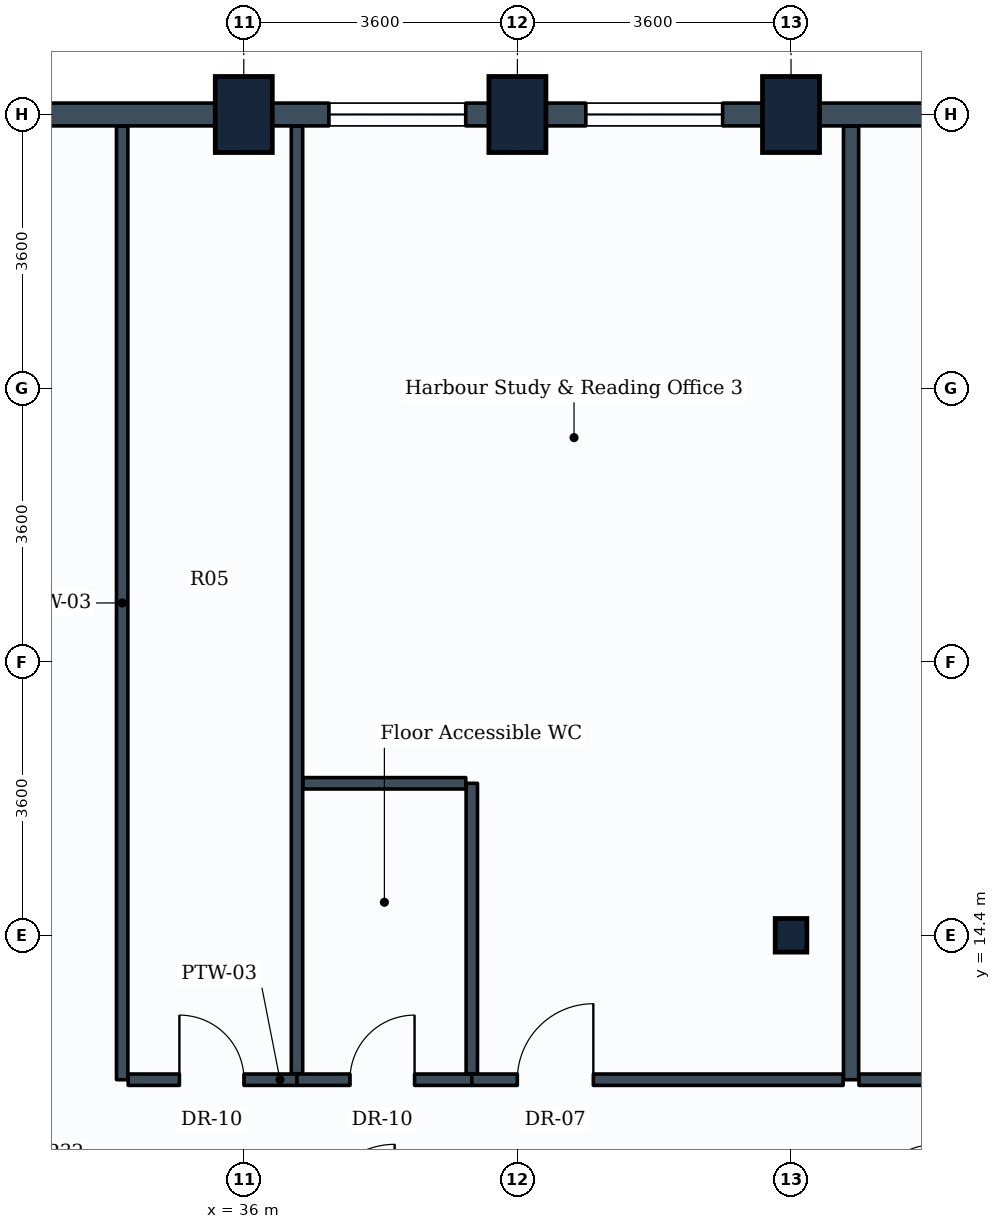
"""IFC4 building model, lengths in metres.
Left out: names, types, materials, properties, quantities, classifications, styles, units other than length and angle.
Written with IfcOpenShell. Run it as: python <this file> out.ifc"""

import sys

from ifc_helpers import new_model, si_unit, direction, frame, frame_2d, origin, origin_2d, place, context, subcontext, project, spatial, rectangle, i_section, extrude, element, fill, save


model = new_model("IFC4")
c1 = context("Model", 3, precision=1e-05, world=origin(), true_north=direction((0.0, 1.0)))
c2 = subcontext(c1, "Body", "Model", "MODEL_VIEW")
j1 = project(units=[si_unit("LENGTHUNIT", "METRE"), si_unit("PLANEANGLEUNIT", "RADIAN")], contexts=[c1])
p1 = place(None, origin())
s1 = spatial("IfcSite", under=j1, at=p1, CompositionType="ELEMENT")
p2 = place(p1, origin())
s2 = spatial("IfcBuilding", under=s1, at=p2, CompositionType="ELEMENT")
p3 = place(p2, frame((0.0, 0.0, 165.6)))
s3 = spatial("IfcBuildingStorey", under=s2, at=p3, CompositionType="ELEMENT", Elevation=165.6)
for number, where, z_axis, x_axis in (
    (1, (36.0, 25.2, 0.0), (0.0, 0.0, 1.0), (1.0, 0.0, 0.0)),
    (2, (39.6, 25.2, 0.0), (0.0, 0.0, 1.0), (1.0, 0.0, 0.0)),
):
    element("IfcColumn", number, at=place(p3, frame(where, z_axis=z_axis, x_axis=x_axis)), inside=s3, PredefinedType="COLUMN", context=c2, shape_type="SweptSolid", body=[
        extrude(rectangle(XDim=0.75, YDim=1.0, at=origin_2d()), origin(), (0.0, 0.0, 1.0), 3.8),
    ])
p4 = place(p3, frame((43.2, 14.4, 0.0), z_axis=(0.0, 0.0, 1.0), x_axis=(1.0, 0.0, 0.0)))
e3 = element("IfcColumn", 3, at=p4, inside=s3, PredefinedType="COLUMN", context=c2, shape_type="SweptSolid", body=[
    extrude(i_section(OverallWidth=0.416, OverallDepth=0.442, WebThickness=0.025, FlangeThickness=0.041, FilletRadius=0.015, at=origin_2d()), origin(), (0.0, 0.0, 1.0), 3.8),
])
p5 = place(p3, frame((43.2, 25.2, 0.0), z_axis=(0.0, 0.0, 1.0), x_axis=(1.0, 0.0, 0.0)))
e4 = element("IfcColumn", 4, at=p5, inside=s3, PredefinedType="COLUMN", context=c2, shape_type="SweptSolid", body=[
    extrude(rectangle(XDim=0.75, YDim=1.0, at=origin_2d()), origin(), (0.0, 0.0, 1.0), 3.8),
])
p6 = place(p3, frame((43.2, 25.2, 0.0), z_axis=(0.0, 0.0, 1.0), x_axis=(1.0, 0.0, 0.0)))
e5 = element("IfcWall", 5, at=p6, inside=s3, PredefinedType="STANDARD", context=c2, shape_type="SweptSolid", body=[
    extrude(rectangle(XDim=3.6, YDim=0.3, at=frame_2d((1.8, 0.0))), origin(), (0.0, 0.0, 1.0), 2.93),
])
p7 = place(p3, frame((39.6, 25.2, 0.0), z_axis=(0.0, 0.0, 1.0), x_axis=(1.0, 0.0, 0.0)))
e6 = element("IfcWall", 6, at=p7, inside=s3, PredefinedType="STANDARD", context=c2, shape_type="SweptSolid", body=[
    extrude(rectangle(XDim=3.6, YDim=0.3, at=frame_2d((1.8, 0.0))), origin(), (0.0, 0.0, 1.0), 2.93),
])
p8 = place(p7, frame((0.9, 0.0, 0.85)))
e7 = element("IfcOpeningElement", 7, at=p8, cuts=e6, PredefinedType="OPENING", context=c2, shape_type="SweptSolid", body=[
    extrude(rectangle(XDim=1.8, YDim=1.35, at=frame_2d((0.9, 0.675))), frame((0.0, 0.16, 0.0), z_axis=(0.0, -1.0, 0.0), x_axis=(1.0, 0.0, 0.0)), (0.0, 0.0, 1.0), 0.32),
])
p9 = place(p3, frame((36.0, 25.2, 0.0), z_axis=(0.0, 0.0, 1.0), x_axis=(1.0, 0.0, 0.0)))
e8 = element("IfcWall", 8, at=p9, inside=s3, PredefinedType="STANDARD", context=c2, shape_type="SweptSolid", body=[
    extrude(rectangle(XDim=3.6, YDim=0.3, at=frame_2d((1.8, 0.0))), origin(), (0.0, 0.0, 1.0), 2.93),
])
p10 = place(p9, frame((1.12, 0.0, 0.85)))
e9 = element("IfcOpeningElement", 9, at=p10, cuts=e8, PredefinedType="OPENING", context=c2, shape_type="SweptSolid", body=[
    extrude(rectangle(XDim=1.8, YDim=1.35, at=frame_2d((0.9, 0.675))), frame((0.0, 0.16, 0.0), z_axis=(0.0, -1.0, 0.0), x_axis=(1.0, 0.0, 0.0)), (0.0, 0.0, 1.0), 0.32),
])
p11 = place(p3, frame((32.4, 25.2, 0.0), z_axis=(0.0, 0.0, 1.0), x_axis=(1.0, 0.0, 0.0)))
e10 = element("IfcWall", 10, at=p11, inside=s3, PredefinedType="STANDARD", context=c2, shape_type="SweptSolid", body=[
    extrude(rectangle(XDim=3.6, YDim=0.3, at=frame_2d((1.8, 0.0))), origin(), (0.0, 0.0, 1.0), 2.93),
])
p12 = place(p3, frame((34.4, 12.5, 0.0), z_axis=(0.0, 0.0, 1.0), x_axis=(0.0, 1.0, 0.0)))
e11 = element("IfcWall", 11, at=p12, inside=s3, PredefinedType="PARTITIONING", context=c2, shape_type="SweptSolid", body=[
    extrude(rectangle(XDim=12.546, YDim=0.15, at=frame_2d((6.273, 0.0))), origin(), (0.0, 0.0, 1.0), 2.93),
])
p13 = place(p3, frame((34.479, 12.5, 0.0), z_axis=(0.0, 0.0, 1.0), x_axis=(1.0, 0.0, 0.0)))
e12 = element("IfcWall", 12, at=p13, inside=s3, PredefinedType="PARTITIONING", context=c2, shape_type="SweptSolid", body=[
    extrude(rectangle(XDim=2.221, YDim=0.15, at=frame_2d((1.11, 0.0))), origin(), (0.0, 0.0, 1.0), 3.15),
])
p14 = place(p13, frame((0.674, 0.0, 0.0)))
e13 = element("IfcOpeningElement", 13, at=p14, cuts=e12, PredefinedType="OPENING", context=c2, shape_type="SweptSolid", body=[
    extrude(rectangle(XDim=0.85, YDim=2.1, at=frame_2d((0.425, 1.05))), frame((0.0, 0.085, 0.0), z_axis=(0.0, -1.0, 0.0), x_axis=(1.0, 0.0, 0.0)), (0.0, 0.0, 1.0), 0.17),
])
p15 = place(p3, frame((36.7, 12.579, 0.0), z_axis=(0.0, 0.0, 1.0), x_axis=(0.0, 1.0, 0.0)))
e14 = element("IfcWall", 14, at=p15, inside=s3, PredefinedType="PARTITIONING", context=c2, shape_type="SweptSolid", body=[
    extrude(rectangle(XDim=12.467, YDim=0.15, at=frame_2d((6.233, 0.0))), origin(), (0.0, 0.0, 1.0), 2.93),
])
p16 = place(p3, frame((36.7, 12.5, 0.0), z_axis=(0.0, 0.0, 1.0), x_axis=(1.0, 0.0, 0.0)))
e15 = element("IfcWall", 15, at=p16, inside=s3, PredefinedType="PARTITIONING", context=c2, shape_type="SweptSolid", body=[
    extrude(rectangle(XDim=2.3, YDim=0.15, at=frame_2d((1.15, 0.0))), origin(), (0.0, 0.0, 1.0), 3.465),
])
p17 = place(p16, frame((0.697, 0.0, 0.0)))
e16 = element("IfcOpeningElement", 16, at=p17, cuts=e15, PredefinedType="OPENING", context=c2, shape_type="SweptSolid", body=[
    extrude(rectangle(XDim=0.85, YDim=2.1, at=frame_2d((0.425, 1.05))), frame((0.0, 0.085, 0.0), z_axis=(0.0, -1.0, 0.0), x_axis=(1.0, 0.0, 0.0)), (0.0, 0.0, 1.0), 0.17),
])
p18 = place(p3, frame((39.0, 12.579, 0.0), z_axis=(0.0, 0.0, 1.0), x_axis=(0.0, 1.0, 0.0)))
e17 = element("IfcWall", 17, at=p18, inside=s3, PredefinedType="PARTITIONING", context=c2, shape_type="SweptSolid", body=[
    extrude(rectangle(XDim=3.821, YDim=0.15, at=frame_2d((1.91, 0.0))), origin(), (0.0, 0.0, 1.0), 3.1),
])
p19 = place(p3, frame((36.779, 16.4, 0.0), z_axis=(0.0, 0.0, 1.0), x_axis=(1.0, 0.0, 0.0)))
e18 = element("IfcWall", 18, at=p19, inside=s3, PredefinedType="PARTITIONING", context=c2, shape_type="SweptSolid", body=[
    extrude(rectangle(XDim=2.142, YDim=0.15, at=frame_2d((1.071, 0.0))), origin(), (0.0, 0.0, 1.0), 3.465),
])
p20 = place(p3, frame((43.99, 12.5, 0.0), z_axis=(0.0, 0.0, 1.0), x_axis=(0.0, 1.0, 0.0)))
e19 = element("IfcWall", 19, at=p20, inside=s3, PredefinedType="PARTITIONING", context=c2, shape_type="SweptSolid", body=[
    extrude(rectangle(XDim=12.546, YDim=0.2, at=frame_2d((6.273, 0.0))), origin(), (0.0, 0.0, 1.0), 2.93),
])
p21 = place(p3, frame((39.0, 12.5, 0.0), z_axis=(0.0, 0.0, 1.0), x_axis=(1.0, 0.0, 0.0)))
e20 = element("IfcWall", 20, at=p21, inside=s3, PredefinedType="PARTITIONING", context=c2, shape_type="SweptSolid", body=[
    extrude(rectangle(XDim=4.886, YDim=0.15, at=frame_2d((2.443, 0.0))), origin(), (0.0, 0.0, 1.0), 3.1),
])
p22 = place(p21, frame((0.599, 0.0, 0.0)))
e21 = element("IfcOpeningElement", 21, at=p22, cuts=e20, PredefinedType="OPENING", context=c2, shape_type="SweptSolid", body=[
    extrude(rectangle(XDim=1.0, YDim=2.1, at=frame_2d((0.5, 1.05))), frame((0.0, 0.085, 0.0), z_axis=(0.0, -1.0, 0.0), x_axis=(1.0, 0.0, 0.0)), (0.0, 0.0, 1.0), 0.17),
])
p23 = place(p3, frame((44.094, 12.5, 0.0), z_axis=(0.0, 0.0, 1.0), x_axis=(1.0, 0.0, 0.0)))
e22 = element("IfcWall", 22, at=p23, inside=s3, PredefinedType="PARTITIONING", context=c2, shape_type="SweptSolid", body=[
    extrude(rectangle(XDim=4.506, YDim=0.15, at=frame_2d((2.253, 0.0))), origin(), (0.0, 0.0, 1.0), 3.1),
])
p24 = place(p23, frame((1.662, 0.0, 0.0)))
e23 = element("IfcOpeningElement", 23, at=p24, cuts=e22, PredefinedType="OPENING", context=c2, shape_type="SweptSolid", body=[
    extrude(rectangle(XDim=1.0, YDim=2.1, at=frame_2d((0.5, 1.05))), frame((0.0, 0.085, 0.0), z_axis=(0.0, -1.0, 0.0), x_axis=(1.0, 0.0, 0.0)), (0.0, 0.0, 1.0), 0.17),
])
p25 = place(p8, origin())
e24 = element("IfcWindow", 24, at=p25, inside=s3, PartitioningType="SINGLE_PANEL", PredefinedType="WINDOW", context=c2, shape_type="SweptSolid", body=[
    extrude(rectangle(XDim=1.8, YDim=1.35, at=frame_2d((0.9, 0.675))), frame((0.0, 0.03, 0.0), z_axis=(0.0, -1.0, 0.0), x_axis=(1.0, 0.0, 0.0)), (0.0, 0.0, 1.0), 0.06),
])
fill(e7, e24)
p26 = place(p10, origin())
e25 = element("IfcWindow", 25, at=p26, inside=s3, PartitioningType="SINGLE_PANEL", PredefinedType="WINDOW", context=c2, shape_type="SweptSolid", body=[
    extrude(rectangle(XDim=1.8, YDim=1.35, at=frame_2d((0.9, 0.675))), frame((0.0, 0.03, 0.0), z_axis=(0.0, -1.0, 0.0), x_axis=(1.0, 0.0, 0.0)), (0.0, 0.0, 1.0), 0.06),
])
fill(e9, e25)
p27 = place(p14, origin())
e26 = element("IfcDoor", 26, at=p27, inside=s3, OperationType="SINGLE_SWING_LEFT", PredefinedType="DOOR", context=c2, shape_type="SweptSolid", body=[
    extrude(rectangle(XDim=0.85, YDim=2.1, at=frame_2d((0.425, 1.05))), frame((0.0, 0.025, 0.0), z_axis=(0.0, -1.0, 0.0), x_axis=(1.0, 0.0, 0.0)), (0.0, 0.0, 1.0), 0.05),
])
fill(e13, e26)
p28 = place(p17, origin())
e27 = element("IfcDoor", 27, at=p28, inside=s3, OperationType="SINGLE_SWING_RIGHT", PredefinedType="DOOR", context=c2, shape_type="SweptSolid", body=[
    extrude(rectangle(XDim=0.85, YDim=2.1, at=frame_2d((0.425, 1.05))), frame((0.0, 0.025, 0.0), z_axis=(0.0, -1.0, 0.0), x_axis=(1.0, 0.0, 0.0)), (0.0, 0.0, 1.0), 0.05),
])
fill(e16, e27)
p29 = place(p22, origin())
e28 = element("IfcDoor", 28, at=p29, inside=s3, OperationType="SINGLE_SWING_RIGHT", PredefinedType="DOOR", context=c2, shape_type="SweptSolid", body=[
    extrude(rectangle(XDim=1.0, YDim=2.1, at=frame_2d((0.5, 1.05))), frame((0.0, 0.025, 0.0), z_axis=(0.0, -1.0, 0.0), x_axis=(1.0, 0.0, 0.0)), (0.0, 0.0, 1.0), 0.05),
])
fill(e21, e28)
save(model, sys.argv[1])
